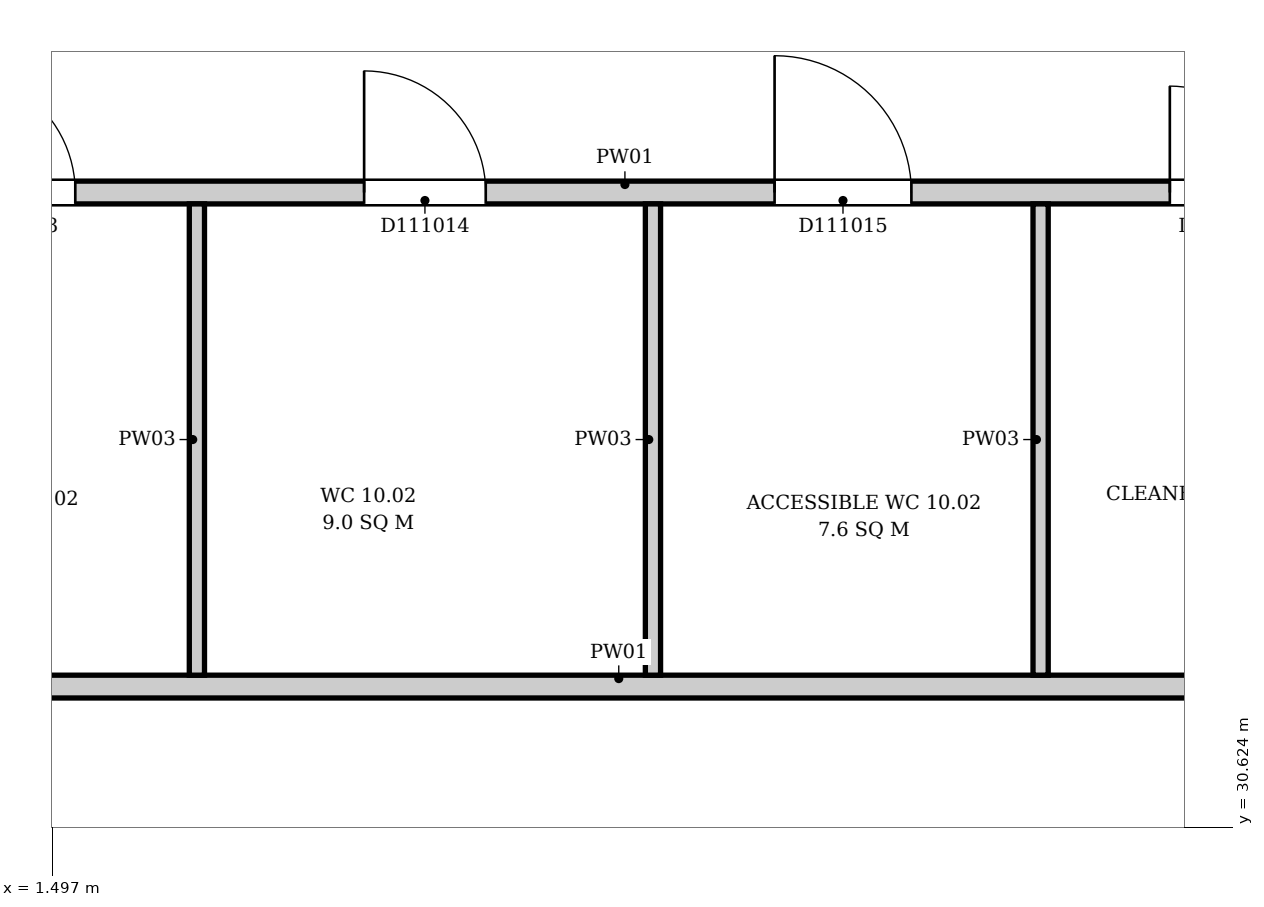
"""IFC4 building model, lengths in metres.
Left out: names, types, materials, properties, quantities, classifications, styles, units other than length and angle.
Written with IfcOpenShell. Run it as: python <this file> out.ifc"""

import sys

from ifc_helpers import new_model, si_unit, direction, frame, frame_2d, origin, place, context, subcontext, project, spatial, rectangle, extrude, element, fill, save


model = new_model("IFC4")
c1 = context("Model", 3, precision=1e-05, world=origin(), true_north=direction((0.0, 1.0)))
c2 = subcontext(c1, "Body", "Model", "MODEL_VIEW")
j1 = project(units=[si_unit("LENGTHUNIT", "METRE"), si_unit("PLANEANGLEUNIT", "RADIAN")], contexts=[c1])
p1 = place(None, origin())
s1 = spatial("IfcSite", under=j1, at=p1, CompositionType="ELEMENT")
p2 = place(p1, origin())
s2 = spatial("IfcBuilding", under=s1, at=p2, CompositionType="ELEMENT")
p3 = place(p2, frame((0.0, 0.0, 52.9)))
s3 = spatial("IfcBuildingStorey", under=s2, at=p3, CompositionType="ELEMENT", Elevation=52.9)
p4 = place(p3, frame((0.056, 31.55, 0.0), z_axis=(0.0, 0.0, 1.0), x_axis=(1.0, 0.0, 0.0)))
e1 = element("IfcWall", 1, at=p4, inside=s3, PredefinedType="PARTITIONING", context=c2, shape_type="SweptSolid", body=[
    extrude(rectangle(XDim=10.338, YDim=0.15, at=frame_2d((5.169, 0.0))), origin(), (0.0, 0.0, 1.0), 3.9),
])
p5 = place(p3, frame((0.056, 34.8, 0.0), z_axis=(0.0, 0.0, 1.0), x_axis=(1.0, 0.0, 0.0)))
e2 = element("IfcWall", 2, at=p5, inside=s3, PredefinedType="PARTITIONING", context=c2, shape_type="SweptSolid", body=[
    extrude(rectangle(XDim=10.419, YDim=0.15, at=frame_2d((5.209, 0.0))), origin(), (0.0, 0.0, 1.0), 3.9),
])
p6 = place(p5, frame((0.794, 0.0, 0.0)))
e3 = element("IfcOpeningElement", 3, at=p6, cuts=e2, PredefinedType="OPENING", context=c2, shape_type="SweptSolid", body=[
    extrude(rectangle(XDim=0.8, YDim=2.1, at=frame_2d((0.4, 1.05))), frame((0.0, 0.085, 0.0), z_axis=(0.0, -1.0, 0.0), x_axis=(1.0, 0.0, 0.0)), (0.0, 0.0, 1.0), 0.17),
])
p7 = place(p5, frame((3.494, 0.0, 0.0)))
e4 = element("IfcOpeningElement", 4, at=p7, cuts=e2, PredefinedType="OPENING", context=c2, shape_type="SweptSolid", body=[
    extrude(rectangle(XDim=0.8, YDim=2.1, at=frame_2d((0.4, 1.05))), frame((0.0, 0.085, 0.0), z_axis=(0.0, -1.0, 0.0), x_axis=(1.0, 0.0, 0.0)), (0.0, 0.0, 1.0), 0.17),
])
p8 = place(p5, frame((6.194, 0.0, 0.0)))
e5 = element("IfcOpeningElement", 5, at=p8, cuts=e2, PredefinedType="OPENING", context=c2, shape_type="SweptSolid", body=[
    extrude(rectangle(XDim=0.9, YDim=2.1, at=frame_2d((0.45, 1.05))), frame((0.0, 0.085, 0.0), z_axis=(0.0, -1.0, 0.0), x_axis=(1.0, 0.0, 0.0)), (0.0, 0.0, 1.0), 0.17),
])
p9 = place(p5, frame((8.794, 0.0, 0.0)))
e6 = element("IfcOpeningElement", 6, at=p9, cuts=e2, PredefinedType="OPENING", context=c2, shape_type="SweptSolid", body=[
    extrude(rectangle(XDim=0.7, YDim=2.1, at=frame_2d((0.35, 1.05))), frame((0.0, 0.085, 0.0), z_axis=(0.0, -1.0, 0.0), x_axis=(1.0, 0.0, 0.0)), (0.0, 0.0, 1.0), 0.17),
])
for number, where, z_axis, x_axis in (
    (7, (2.45, 31.625, 0.0), (0.0, 0.0, 1.0), (0.0, 1.0, 0.0)),
    (8, (5.45, 31.625, 0.0), (0.0, 0.0, 1.0), (0.0, 1.0, 0.0)),
    (9, (8.0, 31.625, 0.0), (0.0, 0.0, 1.0), (0.0, 1.0, 0.0)),
):
    element("IfcWall", number, at=place(p3, frame(where, z_axis=z_axis, x_axis=x_axis)), inside=s3, PredefinedType="PARTITIONING", context=c2, shape_type="SweptSolid", body=[
        extrude(rectangle(XDim=3.1, YDim=0.1, at=frame_2d((1.55, 0.0))), origin(), (0.0, 0.0, 1.0), 3.9),
    ])
p10 = place(p6, origin())
e10 = element("IfcDoor", 10, at=p10, inside=s3, OperationType="SINGLE_SWING_RIGHT", PredefinedType="DOOR", context=c2, shape_type="SweptSolid", body=[
    extrude(rectangle(XDim=0.8, YDim=2.1, at=frame_2d((0.4, 1.05))), frame((0.0, 0.025, 0.0), z_axis=(0.0, -1.0, 0.0), x_axis=(1.0, 0.0, 0.0)), (0.0, 0.0, 1.0), 0.05),
])
fill(e3, e10)
p11 = place(p7, origin())
e11 = element("IfcDoor", 11, at=p11, inside=s3, OperationType="SINGLE_SWING_LEFT", PredefinedType="DOOR", context=c2, shape_type="SweptSolid", body=[
    extrude(rectangle(XDim=0.8, YDim=2.1, at=frame_2d((0.4, 1.05))), frame((0.0, 0.025, 0.0), z_axis=(0.0, -1.0, 0.0), x_axis=(1.0, 0.0, 0.0)), (0.0, 0.0, 1.0), 0.05),
])
fill(e4, e11)
p12 = place(p8, origin())
e12 = element("IfcDoor", 12, at=p12, inside=s3, OperationType="SINGLE_SWING_LEFT", PredefinedType="DOOR", context=c2, shape_type="SweptSolid", body=[
    extrude(rectangle(XDim=0.9, YDim=2.1, at=frame_2d((0.45, 1.05))), frame((0.0, 0.025, 0.0), z_axis=(0.0, -1.0, 0.0), x_axis=(1.0, 0.0, 0.0)), (0.0, 0.0, 1.0), 0.05),
])
fill(e5, e12)
p13 = place(p9, origin())
e13 = element("IfcDoor", 13, at=p13, inside=s3, OperationType="SINGLE_SWING_LEFT", PredefinedType="DOOR", context=c2, shape_type="SweptSolid", body=[
    extrude(rectangle(XDim=0.7, YDim=2.1, at=frame_2d((0.35, 1.05))), frame((0.0, 0.025, 0.0), z_axis=(0.0, -1.0, 0.0), x_axis=(1.0, 0.0, 0.0)), (0.0, 0.0, 1.0), 0.05),
])
fill(e6, e13)
save(model, sys.argv[1])
